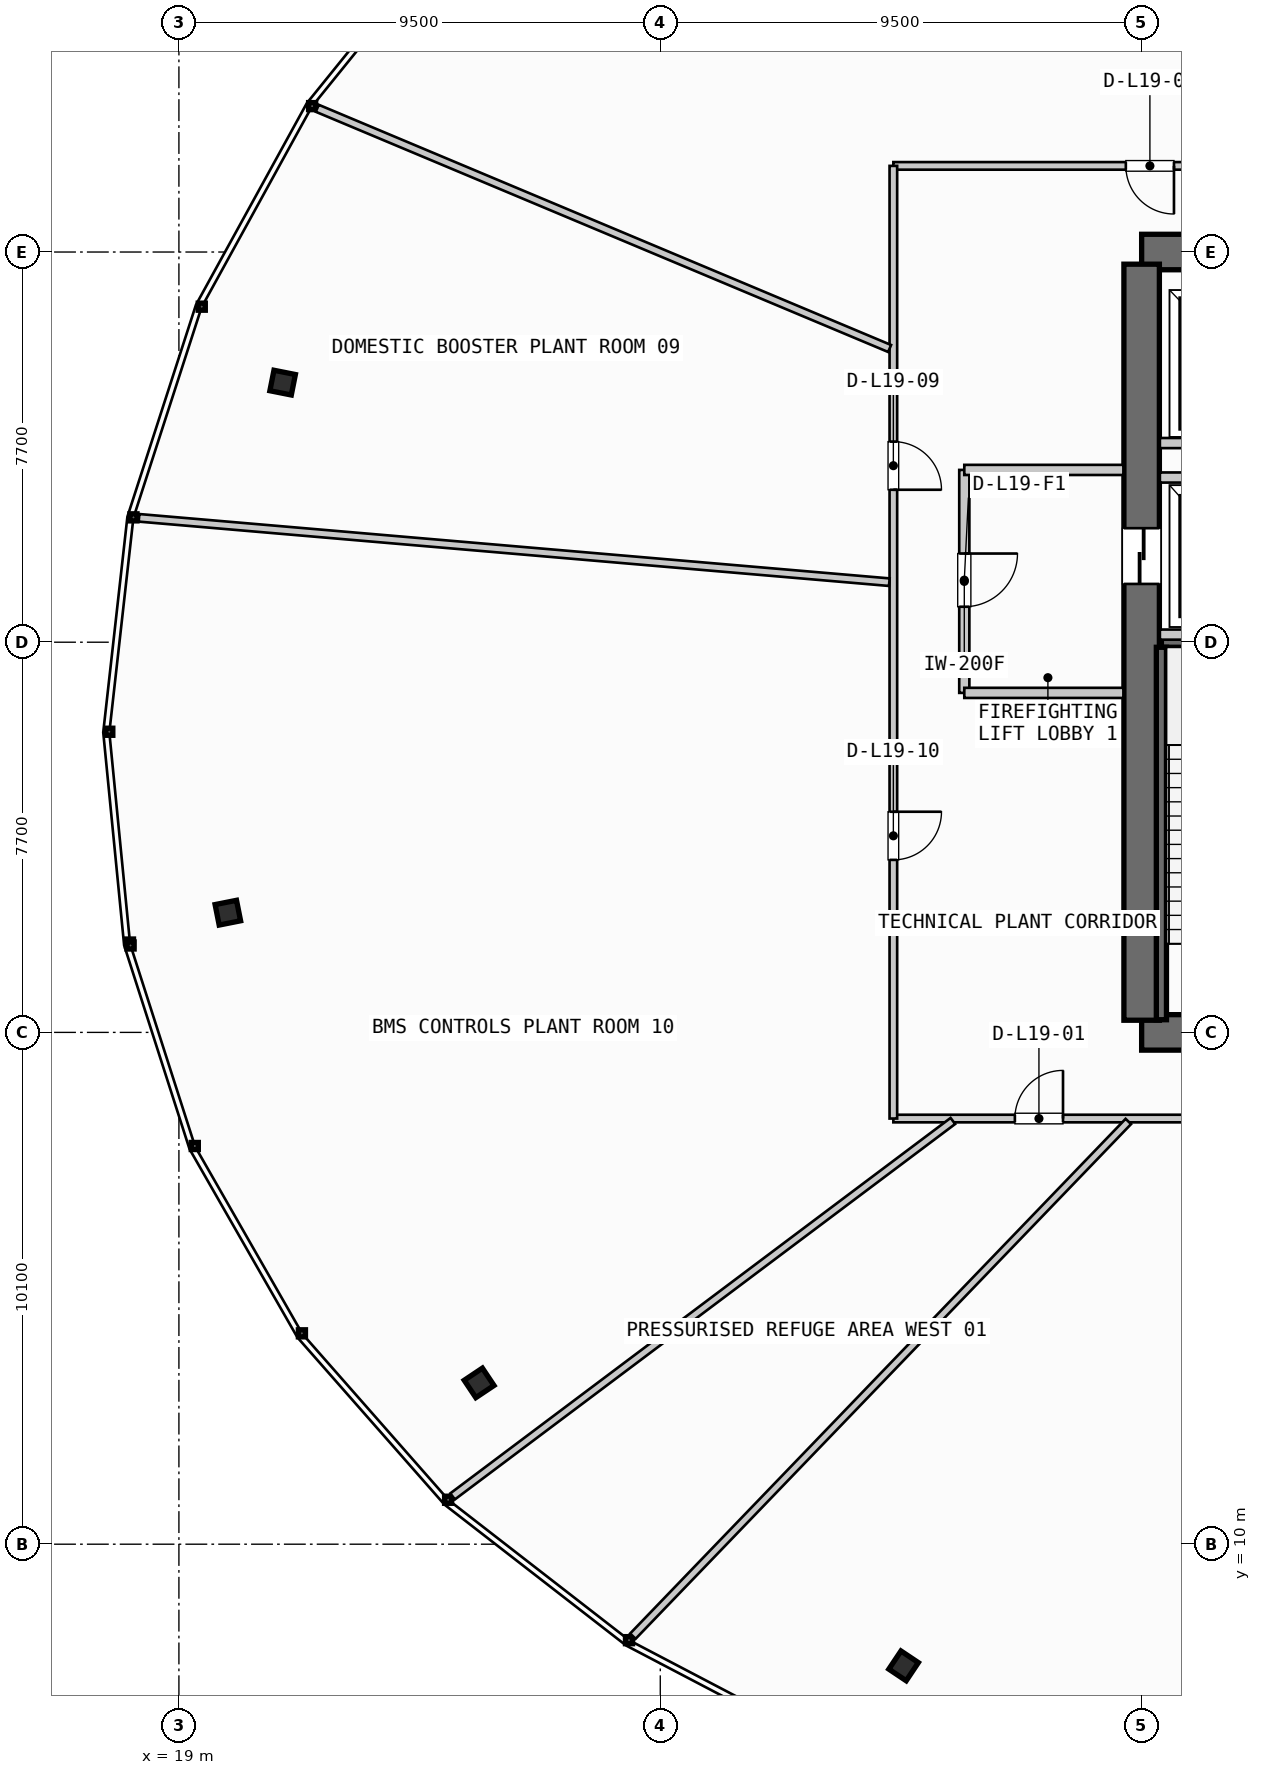
"""IFC4 building model, lengths in metres.
Left out: names, types, materials, properties, quantities, classifications, styles, units other than length and angle.
Written with IfcOpenShell. Run it as: python <this file> out.ifc"""

import sys

from ifc_helpers import new_model, si_unit, direction, frame, frame_2d, origin, origin_2d, place, context, subcontext, project, spatial, rectangle, i_section, extrude, source, transform, mapped, element, fill, save


model = new_model("IFC4")
c1 = context("Model", 3, precision=1e-05, world=origin(), true_north=direction((0.0, 1.0)))
c2 = subcontext(c1, "Body", "Model", "MODEL_VIEW")
j1 = project(units=[si_unit("LENGTHUNIT", "METRE"), si_unit("PLANEANGLEUNIT", "RADIAN")], contexts=[c1])
p1 = place(None, origin())
s1 = spatial("IfcSite", under=j1, at=p1, CompositionType="ELEMENT")
p2 = place(p1, origin())
s2 = spatial("IfcBuilding", under=s1, at=p2, CompositionType="ELEMENT")
p3 = place(p2, frame((0.0, 0.0, 80.4)))
s3 = spatial("IfcBuildingStorey", under=s2, at=p3, CompositionType="ELEMENT", Elevation=80.4)
p4 = place(p3, frame((38.0, 20.1, 0.0), z_axis=(0.0, 0.0, 1.0), x_axis=(1.0, 0.0, 0.0)))
e1 = element("IfcWall", 1, at=p4, inside=s3, PredefinedType="SHEAR", context=c2, shape_type="SweptSolid", body=[
    extrude(rectangle(XDim=17.6, YDim=0.7, at=frame_2d((8.8, 0.0))), origin(), (0.0, 0.0, 1.0), 4.76),
])
p5 = place(p4, frame((1.4, 0.0, 0.0)))
e2 = element("IfcOpeningElement", 2, at=p5, cuts=e1, PredefinedType="OPENING", context=c2, shape_type="SweptSolid", body=[
    extrude(rectangle(XDim=1.05, YDim=2.15, at=frame_2d((0.525, 1.075))), frame((0.0, 0.36, 0.0), z_axis=(0.0, -1.0, 0.0), x_axis=(1.0, 0.0, 0.0)), (0.0, 0.0, 1.0), 0.72),
])
p6 = place(p4, frame((15.15, 0.0, 0.0)))
e3 = element("IfcOpeningElement", 3, at=p6, cuts=e1, PredefinedType="OPENING", context=c2, shape_type="SweptSolid", body=[
    extrude(rectangle(XDim=1.05, YDim=2.15, at=frame_2d((0.525, 1.075))), frame((0.0, 0.36, 0.0), z_axis=(0.0, -1.0, 0.0), x_axis=(1.0, 0.0, 0.0)), (0.0, 0.0, 1.0), 0.72),
])
p7 = place(p3, frame((55.6, 35.5, 0.0), z_axis=(0.0, 0.0, 1.0), x_axis=(-1.0, 0.0, 0.0)))
e4 = element("IfcWall", 4, at=p7, inside=s3, PredefinedType="SHEAR", context=c2, shape_type="SweptSolid", body=[
    extrude(rectangle(XDim=17.6, YDim=0.7, at=frame_2d((8.8, 0.0))), origin(), (0.0, 0.0, 1.0), 4.76),
])
p8 = place(p7, frame((8.05, 0.0, 0.0)))
e5 = element("IfcOpeningElement", 5, at=p8, cuts=e4, PredefinedType="OPENING", context=c2, shape_type="SweptSolid", body=[
    extrude(rectangle(XDim=1.5, YDim=2.2, at=frame_2d((0.75, 1.1))), frame((0.0, 0.36, 0.0), z_axis=(0.0, -1.0, 0.0), x_axis=(1.0, 0.0, 0.0)), (0.0, 0.0, 1.0), 0.72),
])
p9 = place(p7, frame((14.95, 0.0, 0.0)))
e6 = element("IfcOpeningElement", 6, at=p9, cuts=e4, PredefinedType="OPENING", context=c2, shape_type="SweptSolid", body=[
    extrude(rectangle(XDim=1.4, YDim=2.3, at=frame_2d((0.7, 1.15))), frame((0.0, 0.36, 0.0), z_axis=(0.0, -1.0, 0.0), x_axis=(1.0, 0.0, 0.0)), (0.0, 0.0, 1.0), 0.72),
])
p10 = place(p7, frame((12.3, 0.0, 0.0)))
e7 = element("IfcOpeningElement", 7, at=p10, cuts=e4, PredefinedType="OPENING", context=c2, shape_type="SweptSolid", body=[
    extrude(rectangle(XDim=0.95, YDim=2.15, at=frame_2d((0.475, 1.075))), frame((0.0, 0.36, 0.0), z_axis=(0.0, -1.0, 0.0), x_axis=(1.0, 0.0, 0.0)), (0.0, 0.0, 1.0), 0.72),
])
p11 = place(p7, frame((10.2, 0.0, 0.0)))
e8 = element("IfcOpeningElement", 8, at=p11, cuts=e4, PredefinedType="OPENING", context=c2, shape_type="SweptSolid", body=[
    extrude(rectangle(XDim=0.9, YDim=2.15, at=frame_2d((0.45, 1.075))), frame((0.0, 0.36, 0.0), z_axis=(0.0, -1.0, 0.0), x_axis=(1.0, 0.0, 0.0)), (0.0, 0.0, 1.0), 0.72),
])
p12 = place(p3, frame((38.0, 35.26, 0.0), z_axis=(0.0, 0.0, 1.0), x_axis=(0.0, -1.0, 0.0)))
e9 = element("IfcWall", 9, at=p12, inside=s3, PredefinedType="SHEAR", context=c2, shape_type="SweptSolid", body=[
    extrude(rectangle(XDim=14.92, YDim=0.7, at=frame_2d((7.46, 0.0))), origin(), (0.0, 0.0, 1.0), 4.76),
])
p13 = place(p12, frame((5.21, 0.0, 0.0)))
e10 = element("IfcOpeningElement", 10, at=p13, cuts=e9, PredefinedType="OPENING", context=c2, shape_type="SweptSolid", body=[
    extrude(rectangle(XDim=1.1, YDim=2.2, at=frame_2d((0.55, 1.1))), frame((0.0, 0.36, 0.0), z_axis=(0.0, -1.0, 0.0), x_axis=(1.0, 0.0, 0.0)), (0.0, 0.0, 1.0), 0.72),
])
m1 = source(origin(), c2, "Body", "SweptSolid", [
    extrude(i_section(OverallWidth=0.412, OverallDepth=0.431, WebThickness=0.042, FlangeThickness=0.068, FilletRadius=0.015, at=origin_2d()), origin(), (0.0, 0.0, 1.0), 4.76),
])
for number, where, z_axis, x_axis in (
    (11, (21.047, 32.923, 0.0), (0.0, 0.0, 1.0), (-0.981, 0.195, 0.0)),
    (12, (19.966, 22.462, 0.0), (0.0, 0.0, 1.0), (-0.981, -0.195, 0.0)),
    (13, (24.925, 13.183, 0.0), (0.0, 0.0, 1.0), (-0.831, -0.556, 0.0)),
    (14, (33.302, 7.599, 0.0), (0.0, 0.0, 1.0), (-0.556, -0.831, 0.0)),
):
    element("IfcColumn", number, at=place(p3, frame(where, z_axis=z_axis, x_axis=x_axis)), inside=s3, PredefinedType="COLUMN", context=c2, shape_type="MappedRepresentation", body=[
        mapped(m1, transform((0.0, 0.0, 0.0), scale=1.0)),
    ])
p14 = place(p3, frame((38.39, 27.8, 0.0), z_axis=(0.0, 0.0, 1.0), x_axis=(1.0, 0.0, 0.0)))
e15 = element("IfcWall", 15, at=p14, inside=s3, PredefinedType="SHEAR", context=c2, shape_type="SweptSolid", body=[
    extrude(rectangle(XDim=3.06, YDim=0.2, at=frame_2d((1.53, 0.0))), origin(), (0.0, 0.0, 1.0), 4.76),
])
p15 = place(p3, frame((38.39, 20.35, 0.0), z_axis=(0.0, 0.0, 1.0), x_axis=(0.0, 1.0, 0.0)))
e16 = element("IfcWall", 16, at=p15, inside=s3, PredefinedType="SHEAR", context=c2, shape_type="SweptSolid", body=[
    extrude(rectangle(XDim=7.35, YDim=0.2, at=frame_2d((3.675, 0.0))), origin(), (0.0, 0.0, 1.0), 4.76),
])
for number, where, z_axis, x_axis in (
    (17, (38.36, 27.95, 0.0), (0.0, 0.0, 1.0), (1.0, 0.0, 0.0)),
    (18, (38.36, 31.05, 0.0), (0.0, 0.0, 1.0), (1.0, 0.0, 0.0)),
):
    element("IfcWall", number, at=place(p3, frame(where, z_axis=z_axis, x_axis=x_axis)), inside=s3, PredefinedType="PARTITIONING", context=c2, shape_type="SweptSolid", body=[
        extrude(rectangle(XDim=2.79, YDim=0.2, at=frame_2d((1.395, 0.0))), origin(), (0.0, 0.0, 1.0), 2.335),
    ])
p16 = place(p3, frame((34.5, 31.2, 0.0), z_axis=(0.0, 0.0, 1.0), x_axis=(0.0, -1.0, 0.0)))
e19 = element("IfcWall", 19, at=p16, inside=s3, PredefinedType="PARTITIONING", context=c2, shape_type="SweptSolid", body=[
    extrude(rectangle(XDim=4.4, YDim=0.2, at=frame_2d((2.2, 0.0))), origin(), (0.0, 0.0, 1.0), 2.335),
])
p17 = place(p16, frame((1.65, 0.0, 0.0)))
e20 = element("IfcOpeningElement", 20, at=p17, cuts=e19, PredefinedType="OPENING", context=c2, shape_type="SweptSolid", body=[
    extrude(rectangle(XDim=1.05, YDim=2.15, at=frame_2d((0.525, 1.075))), frame((0.0, 0.11, 0.0), z_axis=(0.0, -1.0, 0.0), x_axis=(1.0, 0.0, 0.0)), (0.0, 0.0, 1.0), 0.22),
])
for number, where, z_axis, x_axis in (
    (21, (34.5, 26.8, 0.0), (0.0, 0.0, 1.0), (1.0, 0.0, 0.0)),
    (22, (34.5, 31.2, 0.0), (0.0, 0.0, 1.0), (1.0, 0.0, 0.0)),
):
    element("IfcWall", number, at=place(p3, frame(where, z_axis=z_axis, x_axis=x_axis)), inside=s3, PredefinedType="PARTITIONING", context=c2, shape_type="SweptSolid", body=[
        extrude(rectangle(XDim=3.14, YDim=0.2, at=frame_2d((1.57, 0.0))), origin(), (0.0, 0.0, 1.0), 2.335),
    ])
p18 = place(p3, frame((38.36, 31.73, 0.0), z_axis=(0.0, 0.0, 1.0), x_axis=(1.0, 0.0, 0.0)))
e23 = element("IfcWall", 23, at=p18, inside=s3, PredefinedType="PARTITIONING", context=c2, shape_type="SweptSolid", body=[
    extrude(rectangle(XDim=7.44, YDim=0.2, at=frame_2d((3.72, 0.0))), origin(), (0.0, 0.0, 1.0), 2.335),
])
p19 = place(p3, frame((33.1, 18.4, 0.0), z_axis=(0.0, 0.0, 1.0), x_axis=(1.0, 0.0, 0.0)))
e24 = element("IfcWall", 24, at=p19, inside=s3, PredefinedType="PARTITIONING", context=c2, shape_type="SweptSolid", body=[
    extrude(rectangle(XDim=27.4, YDim=0.15, at=frame_2d((13.7, 0.0))), origin(), (0.0, 0.0, 1.0), 2.335),
])
p20 = place(p19, frame((2.398, 0.0, 0.0)))
e25 = element("IfcOpeningElement", 25, at=p20, cuts=e24, PredefinedType="OPENING", context=c2, shape_type="SweptSolid", body=[
    extrude(rectangle(XDim=0.95, YDim=2.15, at=frame_2d((0.475, 1.075))), frame((0.0, 0.085, 0.0), z_axis=(0.0, -1.0, 0.0), x_axis=(1.0, 0.0, 0.0)), (0.0, 0.0, 1.0), 0.17),
])
p21 = place(p19, frame((10.77, 0.0, 0.0)))
e26 = element("IfcOpeningElement", 26, at=p21, cuts=e24, PredefinedType="OPENING", context=c2, shape_type="SweptSolid", body=[
    extrude(rectangle(XDim=0.95, YDim=2.15, at=frame_2d((0.475, 1.075))), frame((0.0, 0.085, 0.0), z_axis=(0.0, -1.0, 0.0), x_axis=(1.0, 0.0, 0.0)), (0.0, 0.0, 1.0), 0.17),
])
p22 = place(p19, frame((21.875, 0.0, 0.0)))
e27 = element("IfcOpeningElement", 27, at=p22, cuts=e24, PredefinedType="OPENING", context=c2, shape_type="SweptSolid", body=[
    extrude(rectangle(XDim=0.95, YDim=2.15, at=frame_2d((0.475, 1.075))), frame((0.0, 0.085, 0.0), z_axis=(0.0, -1.0, 0.0), x_axis=(1.0, 0.0, 0.0)), (0.0, 0.0, 1.0), 0.17),
])
p23 = place(p3, frame((60.5, 37.2, 0.0), z_axis=(0.0, 0.0, 1.0), x_axis=(-1.0, 0.0, 0.0)))
e28 = element("IfcWall", 28, at=p23, inside=s3, PredefinedType="PARTITIONING", context=c2, shape_type="SweptSolid", body=[
    extrude(rectangle(XDim=27.4, YDim=0.15, at=frame_2d((13.7, 0.0))), origin(), (0.0, 0.0, 1.0), 2.335),
])
p24 = place(p23, frame((3.24, 0.0, 0.0)))
e29 = element("IfcOpeningElement", 29, at=p24, cuts=e28, PredefinedType="OPENING", context=c2, shape_type="SweptSolid", body=[
    extrude(rectangle(XDim=0.95, YDim=2.15, at=frame_2d((0.475, 1.075))), frame((0.0, 0.085, 0.0), z_axis=(0.0, -1.0, 0.0), x_axis=(1.0, 0.0, 0.0)), (0.0, 0.0, 1.0), 0.17),
])
p25 = place(p23, frame((11.856, 0.0, 0.0)))
e30 = element("IfcOpeningElement", 30, at=p25, cuts=e28, PredefinedType="OPENING", context=c2, shape_type="SweptSolid", body=[
    extrude(rectangle(XDim=0.95, YDim=2.15, at=frame_2d((0.475, 1.075))), frame((0.0, 0.085, 0.0), z_axis=(0.0, -1.0, 0.0), x_axis=(1.0, 0.0, 0.0)), (0.0, 0.0, 1.0), 0.17),
])
p26 = place(p23, frame((21.862, 0.0, 0.0)))
e31 = element("IfcOpeningElement", 31, at=p26, cuts=e28, PredefinedType="OPENING", context=c2, shape_type="SweptSolid", body=[
    extrude(rectangle(XDim=0.95, YDim=2.15, at=frame_2d((0.475, 1.075))), frame((0.0, 0.085, 0.0), z_axis=(0.0, -1.0, 0.0), x_axis=(1.0, 0.0, 0.0)), (0.0, 0.0, 1.0), 0.17),
])
p27 = place(p3, frame((33.1, 37.2, 0.0), z_axis=(0.0, 0.0, 1.0), x_axis=(0.0, -1.0, 0.0)))
e32 = element("IfcWall", 32, at=p27, inside=s3, PredefinedType="PARTITIONING", context=c2, shape_type="SweptSolid", body=[
    extrude(rectangle(XDim=18.8, YDim=0.15, at=frame_2d((9.4, 0.0))), origin(), (0.0, 0.0, 1.0), 2.335),
])
p28 = place(p27, frame((5.441, 0.0, 0.0)))
e33 = element("IfcOpeningElement", 33, at=p28, cuts=e32, PredefinedType="OPENING", context=c2, shape_type="SweptSolid", body=[
    extrude(rectangle(XDim=0.95, YDim=2.15, at=frame_2d((0.475, 1.075))), frame((0.0, 0.085, 0.0), z_axis=(0.0, -1.0, 0.0), x_axis=(1.0, 0.0, 0.0)), (0.0, 0.0, 1.0), 0.17),
])
p29 = place(p27, frame((12.746, 0.0, 0.0)))
e34 = element("IfcOpeningElement", 34, at=p29, cuts=e32, PredefinedType="OPENING", context=c2, shape_type="SweptSolid", body=[
    extrude(rectangle(XDim=0.95, YDim=2.15, at=frame_2d((0.475, 1.075))), frame((0.0, 0.085, 0.0), z_axis=(0.0, -1.0, 0.0), x_axis=(1.0, 0.0, 0.0)), (0.0, 0.0, 1.0), 0.17),
])
p30 = place(p3, frame((34.274, 18.352, 0.0), z_axis=(0.0, 0.0, 1.0), x_axis=(-0.799838579298, -0.600215167308, 0.0)))
e35 = element("IfcWall", 35, at=p30, inside=s3, PredefinedType="PARTITIONING", context=c2, shape_type="SweptSolid", body=[
    extrude(rectangle(XDim=12.344, YDim=0.15, at=frame_2d((6.172, 0.0))), origin(), (0.0, 0.0, 1.0), 2.335),
])
p31 = place(p3, frame((37.738, 18.342, 0.0), z_axis=(0.0, 0.0, 1.0), x_axis=(-0.693541516042, -0.720416661055, 0.0)))
e36 = element("IfcWall", 36, at=p31, inside=s3, PredefinedType="PARTITIONING", context=c2, shape_type="SweptSolid", body=[
    extrude(rectangle(XDim=14.099, YDim=0.15, at=frame_2d((7.049, 0.0))), origin(), (0.0, 0.0, 1.0), 2.335),
])
p32 = place(p3, frame((42.614, 37.273, 0.0), z_axis=(0.0, 0.0, 1.0), x_axis=(-0.404136937948, 0.914698494252, 0.0)))
e37 = element("IfcWall", 37, at=p32, inside=s3, PredefinedType="PARTITIONING", context=c2, shape_type="SweptSolid", body=[
    extrude(rectangle(XDim=13.769, YDim=0.15, at=frame_2d((6.884, 0.0))), origin(), (0.0, 0.0, 1.0), 2.335),
])
p33 = place(p3, frame((33.026, 33.596, 0.0), z_axis=(0.0, 0.0, 1.0), x_axis=(-0.922101034733, 0.386949197885, 0.0)))
e38 = element("IfcWall", 38, at=p33, inside=s3, PredefinedType="PARTITIONING", context=c2, shape_type="SweptSolid", body=[
    extrude(rectangle(XDim=12.25, YDim=0.15, at=frame_2d((6.125, 0.0))), origin(), (0.0, 0.0, 1.0), 2.335),
])
p34 = place(p3, frame((33.02, 28.985, 0.0), z_axis=(0.0, 0.0, 1.0), x_axis=(-0.996342214826, 0.085452858087, 0.0)))
e39 = element("IfcWall", 39, at=p34, inside=s3, PredefinedType="PARTITIONING", context=c2, shape_type="SweptSolid", body=[
    extrude(rectangle(XDim=14.862, YDim=0.15, at=frame_2d((7.431, 0.0))), origin(), (0.0, 0.0, 1.0), 2.335),
])
m2 = source(origin(), c2, "Body", "SweptSolid", [
    extrude(rectangle(XDim=1.1, YDim=2.2, at=frame_2d((0.55, 1.1))), frame((0.0, 0.025, 0.0), z_axis=(0.0, -1.0, 0.0), x_axis=(1.0, 0.0, 0.0)), (0.0, 0.0, 1.0), 0.05),
])
p35 = place(p13, origin())
e40 = element("IfcDoor", 40, at=p35, inside=s3, OperationType="SLIDING_TO_LEFT", PredefinedType="DOOR", context=c2, shape_type="MappedRepresentation", body=[
    mapped(m2, transform((0.0, 0.0, 0.0), scale=1.0)),
])
fill(e10, e40)
m3 = source(origin(), c2, "Body", "SweptSolid", [
    extrude(rectangle(XDim=1.05, YDim=2.15, at=frame_2d((0.525, 1.075))), frame((0.0, 0.025, 0.0), z_axis=(0.0, -1.0, 0.0), x_axis=(1.0, 0.0, 0.0)), (0.0, 0.0, 1.0), 0.05),
])
p36 = place(p17, origin())
e41 = element("IfcDoor", 41, at=p36, inside=s3, OperationType="SINGLE_SWING_LEFT", PredefinedType="DOOR", context=c2, shape_type="MappedRepresentation", body=[
    mapped(m3, transform((0.0, 0.0, 0.0), scale=1.0)),
])
fill(e20, e41)
m4 = source(origin(), c2, "Body", "SweptSolid", [
    extrude(rectangle(XDim=0.95, YDim=2.15, at=frame_2d((0.475, 1.075))), frame((0.0, 0.025, 0.0), z_axis=(0.0, -1.0, 0.0), x_axis=(1.0, 0.0, 0.0)), (0.0, 0.0, 1.0), 0.05),
])
p37 = place(p20, origin())
e42 = element("IfcDoor", 42, at=p37, inside=s3, OperationType="SINGLE_SWING_RIGHT", PredefinedType="DOOR", context=c2, shape_type="MappedRepresentation", body=[
    mapped(m4, transform((0.0, 0.0, 0.0), scale=1.0)),
])
fill(e25, e42)
p38 = place(p26, origin())
e43 = element("IfcDoor", 43, at=p38, inside=s3, OperationType="SINGLE_SWING_LEFT", PredefinedType="DOOR", context=c2, shape_type="MappedRepresentation", body=[
    mapped(m4, transform((0.0, 0.0, 0.0), scale=1.0)),
])
fill(e31, e43)
p39 = place(p28, origin())
e44 = element("IfcDoor", 44, at=p39, inside=s3, OperationType="SINGLE_SWING_RIGHT", PredefinedType="DOOR", context=c2, shape_type="MappedRepresentation", body=[
    mapped(m4, transform((0.0, 0.0, 0.0), scale=1.0)),
])
fill(e33, e44)
p40 = place(p29, origin())
e45 = element("IfcDoor", 45, at=p40, inside=s3, OperationType="SINGLE_SWING_LEFT", PredefinedType="DOOR", context=c2, shape_type="MappedRepresentation", body=[
    mapped(m4, transform((0.0, 0.0, 0.0), scale=1.0)),
])
fill(e34, e45)
save(model, sys.argv[1])
